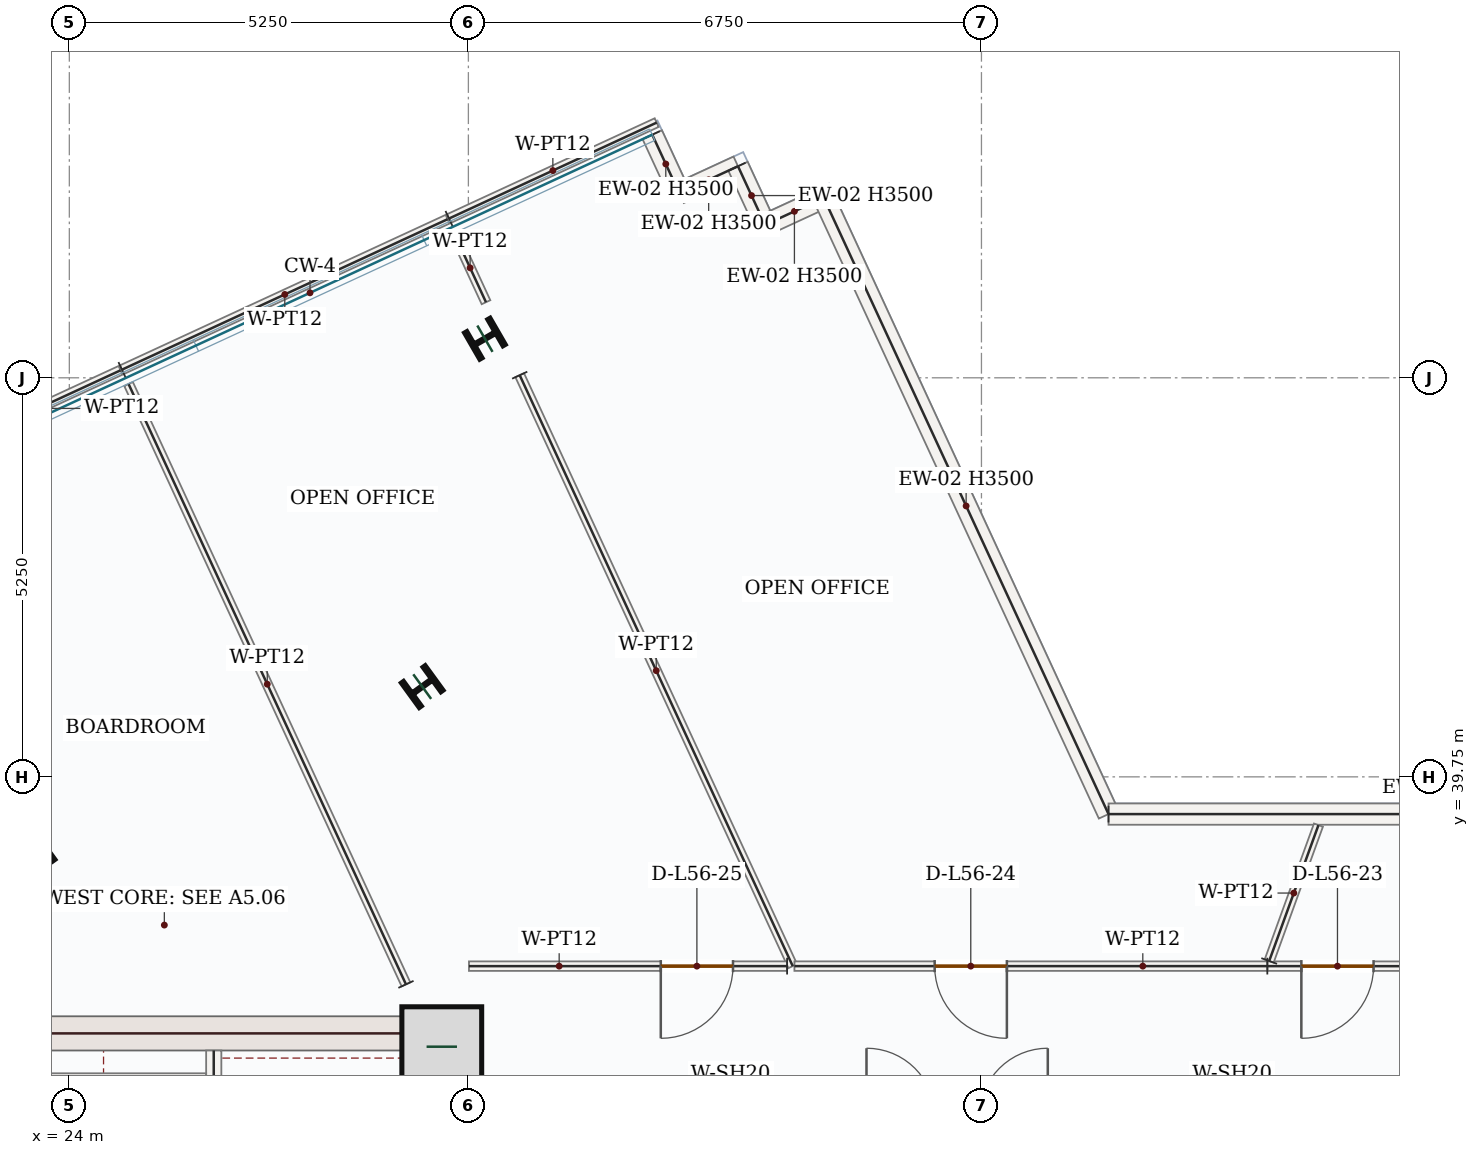
"""IFC4 building model, lengths in metres.
Left out: names, types, materials, properties, quantities, classifications, styles, units other than length and angle.
Written with IfcOpenShell. Run it as: python <this file> out.ifc"""

import sys

from ifc_helpers import new_model, si_unit, direction, frame, frame_2d, origin, origin_2d, place, context, subcontext, project, spatial, rectangle, i_section, extrude, source, transform, mapped, element, fill, save


model = new_model("IFC4")
c1 = context("Model", 3, precision=1e-05, world=origin(), true_north=direction((0.0, 1.0)))
c2 = subcontext(c1, "Body", "Model", "MODEL_VIEW")
j1 = project(units=[si_unit("LENGTHUNIT", "METRE"), si_unit("PLANEANGLEUNIT", "RADIAN")], contexts=[c1])
p1 = place(None, origin())
s1 = spatial("IfcSite", under=j1, at=p1, CompositionType="ELEMENT")
p2 = place(p1, origin())
s2 = spatial("IfcBuilding", under=s1, at=p2, CompositionType="ELEMENT")
p3 = place(p2, frame((0.0, 0.0, 239.1)))
s3 = spatial("IfcBuildingStorey", under=s2, at=p3, CompositionType="ELEMENT", Elevation=239.1)
p4 = place(p3, frame((29.025, 28.05, 0.0), z_axis=(0.0, 0.0, 1.0), x_axis=(0.0, 1.0, 0.0)))
e1 = element("IfcWall", 1, at=p4, inside=s3, PredefinedType="SHEAR", context=c2, shape_type="SweptSolid", body=[
    extrude(rectangle(XDim=8.55, YDim=0.45, at=frame_2d((4.275, 0.0))), origin(), (0.0, 0.0, 1.0), 3.5),
])
p5 = place(p4, frame((1.5, 0.0, 0.0)))
e2 = element("IfcOpeningElement", 2, at=p5, cuts=e1, PredefinedType="OPENING", context=c2, shape_type="SweptSolid", body=[
    extrude(rectangle(XDim=1.1, YDim=2.2, at=frame_2d((0.55, 1.1))), frame((0.0, 0.235, 0.0), z_axis=(0.0, -1.0, 0.0), x_axis=(1.0, 0.0, 0.0)), (0.0, 0.0, 1.0), 0.47),
])
m1 = source(origin(), c2, "Body", "SweptSolid", [
    extrude(rectangle(XDim=7.1, YDim=0.45, at=frame_2d((3.55, 0.0))), origin(), (0.0, 0.0, 1.0), 3.5),
])
p6 = place(p3, frame((21.7, 36.375, 0.0), z_axis=(0.0, 0.0, 1.0), x_axis=(1.0, 0.0, 0.0)))
e3 = element("IfcWall", 3, at=p6, inside=s3, PredefinedType="SHEAR", context=c2, shape_type="MappedRepresentation", body=[
    mapped(m1, transform((0.0, 0.0, 0.0), x_axis=(1.0, 0.0, 0.0), y_axis=(0.0, 1.0, 0.0), z_axis=(0.0, 0.0, 1.0), scale=1.0)),
])
m2 = source(origin(), c2, "Body", "SweptSolid", [
    extrude(rectangle(XDim=1.05, YDim=1.05, at=origin_2d()), origin(), (0.0, 0.0, 1.0), 3.75),
])
p7 = place(p3, frame((28.9, 36.2, 0.0), z_axis=(0.0, 0.0, 1.0), x_axis=(1.0, 0.0, 0.0)))
e4 = element("IfcColumn", 4, at=p7, inside=s3, PredefinedType="COLUMN", context=c2, shape_type="MappedRepresentation", body=[
    mapped(m2, transform((0.0, 0.0, 0.0), x_axis=(1.0, 0.0, 0.0), y_axis=(0.0, 1.0, 0.0), z_axis=(0.0, 0.0, 1.0), scale=1.0)),
])
m3 = source(origin(), c2, "Body", "SweptSolid", [
    extrude(i_section(OverallWidth=0.399, OverallDepth=0.386, WebThickness=0.021, FlangeThickness=0.033, FilletRadius=0.018, at=origin_2d()), origin(), (0.0, 0.0, 1.0), 3.75),
])
for number, where, z_axis, x_axis in (
    (5, (28.643, 40.937, 0.0), (0.0, 0.0, 1.0), (-0.588, 0.809, 0.0)),
    (6, (23.536, 38.711, 0.0), (0.0, 0.0, 1.0), (-0.588, 0.809, 0.0)),
    (7, (29.468, 45.514, 0.0), (0.0, 0.0, 1.0), (-0.5, 0.866, 0.0)),
):
    element("IfcColumn", number, at=place(p3, frame(where, z_axis=z_axis, x_axis=x_axis)), inside=s3, PredefinedType="COLUMN", context=c2, shape_type="MappedRepresentation", body=[
        mapped(m3, transform((0.0, 0.0, 0.0), x_axis=(1.0, 0.0, 0.0), y_axis=(0.0, 1.0, 0.0), z_axis=(0.0, 0.0, 1.0), scale=1.0)),
    ])
m4 = source(origin(), c2, "Body", "SweptSolid", [
    extrude(rectangle(XDim=0.85, YDim=0.28, at=frame_2d((0.425, 0.0))), origin(), (0.0, 0.0, 1.0), 3.5),
])
p8 = place(p3, frame((31.669, 48.198, 0.0), z_axis=(0.0, 0.0, 1.0), x_axis=(0.419422493365, -0.907791150023, 0.0)))
e8 = element("IfcWall", 8, at=p8, inside=s3, PredefinedType="SOLIDWALL", context=c2, shape_type="MappedRepresentation", body=[
    mapped(m4, transform((0.0, 0.0, 0.0), x_axis=(1.0, 0.0, 0.0), y_axis=(0.0, 1.0, 0.0), z_axis=(0.0, 0.0, 1.0), scale=1.0)),
])
m5 = source(origin(), c2, "Body", "SweptSolid", [
    extrude(rectangle(XDim=0.85, YDim=0.28, at=frame_2d((0.425, 0.0))), origin(), (0.0, 0.0, 1.0), 3.5),
])
p9 = place(p3, frame((32.025, 47.427, 0.0), z_axis=(0.0, 0.0, 1.0), x_axis=(0.907841666427, 0.419313139191, 0.0)))
e9 = element("IfcWall", 9, at=p9, inside=s3, PredefinedType="SOLIDWALL", context=c2, shape_type="MappedRepresentation", body=[
    mapped(m5, transform((0.0, 0.0, 0.0), x_axis=(1.0, 0.0, 0.0), y_axis=(0.0, 1.0, 0.0), z_axis=(0.0, 0.0, 1.0), scale=1.0)),
])
p10 = place(p3, frame((32.797, 47.783, 0.0), z_axis=(0.0, 0.0, 1.0), x_axis=(0.419422493365, -0.907791150023, 0.0)))
e10 = element("IfcWall", 10, at=p10, inside=s3, PredefinedType="SOLIDWALL", context=c2, shape_type="MappedRepresentation", body=[
    mapped(m4, transform((0.0, 0.0, 0.0), x_axis=(1.0, 0.0, 0.0), y_axis=(0.0, 1.0, 0.0), z_axis=(0.0, 0.0, 1.0), scale=1.0)),
])
p11 = place(p3, frame((33.154, 47.012, 0.0), z_axis=(0.0, 0.0, 1.0), x_axis=(0.907841666427, 0.419313139191, 0.0)))
e11 = element("IfcWall", 11, at=p11, inside=s3, PredefinedType="SOLIDWALL", context=c2, shape_type="MappedRepresentation", body=[
    mapped(m5, transform((0.0, 0.0, 0.0), x_axis=(1.0, 0.0, 0.0), y_axis=(0.0, 1.0, 0.0), z_axis=(0.0, 0.0, 1.0), scale=1.0)),
])
m6 = source(origin(), c2, "Body", "SweptSolid", [
    extrude(rectangle(XDim=8.932, YDim=0.28, at=frame_2d((4.466, 0.0))), origin(), (0.0, 0.0, 1.0), 3.5),
])
p12 = place(p3, frame((33.925, 47.368, 0.0), z_axis=(0.0, 0.0, 1.0), x_axis=(0.419437747849, -0.90778410191, 0.0)))
e12 = element("IfcWall", 12, at=p12, inside=s3, PredefinedType="SOLIDWALL", context=c2, shape_type="MappedRepresentation", body=[
    mapped(m6, transform((0.0, 0.0, 0.0), x_axis=(1.0, 0.0, 0.0), y_axis=(0.0, 1.0, 0.0), z_axis=(0.0, 0.0, 1.0), scale=1.0)),
])
m7 = source(origin(), c2, "Body", "SweptSolid", [
    extrude(rectangle(XDim=8.984, YDim=0.28, at=frame_2d((4.492, 0.0))), origin(), (0.0, 0.0, 1.0), 2.772),
])
p13 = place(p3, frame((37.672, 39.26, 0.0), z_axis=(0.0, 0.0, 1.0), x_axis=(1.0, 0.0, 0.0)))
e13 = element("IfcWall", 13, at=p13, inside=s3, PredefinedType="SOLIDWALL", context=c2, shape_type="MappedRepresentation", body=[
    mapped(m7, transform((0.0, 0.0, 0.0), x_axis=(1.0, 0.0, 0.0), y_axis=(0.0, 1.0, 0.0), z_axis=(0.0, 0.0, 1.0), scale=1.0)),
])
p14 = place(p3, frame((25.9, 28.15, 0.0), z_axis=(0.0, 0.0, 1.0), x_axis=(0.0, 1.0, 0.0)))
e14 = element("IfcWall", 14, at=p14, inside=s3, PredefinedType="SOLIDWALL", context=c2, shape_type="SweptSolid", body=[
    extrude(rectangle(XDim=8.0, YDim=0.2, at=frame_2d((4.0, 0.0))), origin(), (0.0, 0.0, 1.0), 3.5),
])
p15 = place(p14, frame((0.4, 0.0, 0.0)))
e15 = element("IfcOpeningElement", 15, at=p15, cuts=e14, PredefinedType="OPENING", context=c2, shape_type="SweptSolid", body=[
    extrude(rectangle(XDim=1.05, YDim=2.15, at=frame_2d((0.525, 1.075))), frame((0.0, 0.11, 0.0), z_axis=(0.0, -1.0, 0.0), x_axis=(1.0, 0.0, 0.0)), (0.0, 0.0, 1.0), 0.22),
])
m8 = source(origin(), c2, "Body", "SweptSolid", [
    extrude(rectangle(XDim=3.25, YDim=0.2, at=frame_2d((1.625, 0.0))), origin(), (0.0, 0.0, 1.0), 3.5),
])
p16 = place(p3, frame((22.55, 35.75, 0.0), z_axis=(0.0, 0.0, 1.0), x_axis=(1.0, 0.0, 0.0)))
e16 = element("IfcWall", 16, at=p16, inside=s3, PredefinedType="SOLIDWALL", context=c2, shape_type="MappedRepresentation", body=[
    mapped(m8, transform((0.0, 0.0, 0.0), x_axis=(1.0, 0.0, 0.0), y_axis=(0.0, 1.0, 0.0), z_axis=(0.0, 0.0, 1.0), scale=1.0)),
])
p17 = place(p3, frame((42.747, 37.259, 0.0), z_axis=(0.0, 0.0, 1.0), x_axis=(-0.999999916415, 0.000408864141, 0.0)))
e17 = element("IfcWall", 17, at=p17, inside=s3, PredefinedType="PARTITIONING", context=c2, shape_type="SweptSolid", body=[
    extrude(rectangle(XDim=2.986, YDim=0.125, at=frame_2d((1.493, 0.0))), origin(), (0.0, 0.0, 1.0), 3.5),
])
p18 = place(p17, frame((1.588, 0.0, 0.0)))
e18 = element("IfcOpeningElement", 18, at=p18, cuts=e17, PredefinedType="OPENING", context=c2, shape_type="SweptSolid", body=[
    extrude(rectangle(XDim=0.95, YDim=2.15, at=frame_2d((0.475, 1.075))), frame((0.0, 0.073, 0.0), z_axis=(0.0, -1.0, 0.0), x_axis=(1.0, 0.0, 0.0)), (0.0, 0.0, 1.0), 0.145),
])
m9 = source(origin(), c2, "Body", "SweptSolid", [
    extrude(rectangle(XDim=1.901, YDim=0.125, at=frame_2d((0.951, 0.0))), origin(), (0.0, 0.0, 1.0), 3.5),
])
p19 = place(p3, frame((39.785, 37.327, 0.0), z_axis=(0.0, 0.0, 1.0), x_axis=(0.340887270823, 0.940104179648, 0.0)))
e19 = element("IfcWall", 19, at=p19, inside=s3, PredefinedType="PARTITIONING", context=c2, shape_type="MappedRepresentation", body=[
    mapped(m9, transform((0.0, 0.0, 0.0), x_axis=(1.0, 0.0, 0.0), y_axis=(0.0, 1.0, 0.0), z_axis=(0.0, 0.0, 1.0), scale=1.0)),
])
m10 = source(origin(), c2, "Body", "SweptSolid", [
    extrude(rectangle(XDim=8.564, YDim=0.125, at=frame_2d((4.282, 0.0))), origin(), (0.0, 0.0, 1.0), 3.5),
])
p20 = place(p3, frame((29.925, 45.034, 0.0), z_axis=(0.0, 0.0, 1.0), x_axis=(0.419463084945, -0.907772394584, 0.0)))
e20 = element("IfcWall", 20, at=p20, inside=s3, PredefinedType="PARTITIONING", context=c2, shape_type="MappedRepresentation", body=[
    mapped(m10, transform((0.0, 0.0, 0.0), x_axis=(1.0, 0.0, 0.0), y_axis=(0.0, 1.0, 0.0), z_axis=(0.0, 0.0, 1.0), scale=1.0)),
])
p21 = place(p3, frame((33.443, 37.26, 0.0), z_axis=(0.0, 0.0, 1.0), x_axis=(-0.999999998299, -5.8329445e-05, 0.0)))
e21 = element("IfcWall", 21, at=p21, inside=s3, PredefinedType="PARTITIONING", context=c2, shape_type="SweptSolid", body=[
    extrude(rectangle(XDim=4.186, YDim=0.125, at=frame_2d((2.093, 0.0))), origin(), (0.0, 0.0, 1.0), 3.5),
])
p22 = place(p21, frame((0.712, 0.0, 0.0)))
e22 = element("IfcOpeningElement", 22, at=p22, cuts=e21, PredefinedType="OPENING", context=c2, shape_type="SweptSolid", body=[
    extrude(rectangle(XDim=0.95, YDim=2.15, at=frame_2d((0.475, 1.075))), frame((0.0, 0.073, 0.0), z_axis=(0.0, -1.0, 0.0), x_axis=(1.0, 0.0, 0.0)), (0.0, 0.0, 1.0), 0.145),
])
m11 = source(origin(), c2, "Body", "SweptSolid", [
    extrude(rectangle(XDim=8.701, YDim=0.125, at=frame_2d((4.351, 0.0))), origin(), (0.0, 0.0, 1.0), 3.5),
])
p23 = place(p3, frame((28.429, 37.02, 0.0), z_axis=(0.0, 0.0, 1.0), x_axis=(-0.419458495046, 0.907774515468, 0.0)))
e23 = element("IfcWall", 23, at=p23, inside=s3, PredefinedType="PARTITIONING", context=c2, shape_type="MappedRepresentation", body=[
    mapped(m11, transform((0.0, 0.0, 0.0), x_axis=(1.0, 0.0, 0.0), y_axis=(0.0, 1.0, 0.0), z_axis=(0.0, 0.0, 1.0), scale=1.0)),
])
m12 = source(origin(), c2, "Body", "SweptSolid", [
    extrude(rectangle(XDim=4.72, YDim=0.125, at=frame_2d((2.36, 0.0))), origin(), (0.0, 0.0, 1.0), 3.5),
])
p24 = place(p3, frame((24.692, 45.107, 0.0), z_axis=(0.0, 0.0, 1.0), x_axis=(0.907753377062, 0.419504238873, 0.0)))
e24 = element("IfcWall", 24, at=p24, inside=s3, PredefinedType="PARTITIONING", context=c2, shape_type="MappedRepresentation", body=[
    mapped(m12, transform((0.0, 0.0, 0.0), x_axis=(1.0, 0.0, 0.0), y_axis=(0.0, 1.0, 0.0), z_axis=(0.0, 0.0, 1.0), scale=1.0)),
])
m13 = source(origin(), c2, "Body", "SweptSolid", [
    extrude(rectangle(XDim=0.996, YDim=0.125, at=frame_2d((0.498, 0.0))), origin(), (0.0, 0.0, 1.0), 3.5),
])
p25 = place(p3, frame((29.064, 46.898, 0.0), z_axis=(0.0, 0.0, 1.0), x_axis=(0.419540149112, -0.907736780836, 0.0)))
e25 = element("IfcWall", 25, at=p25, inside=s3, PredefinedType="PARTITIONING", context=c2, shape_type="MappedRepresentation", body=[
    mapped(m13, transform((0.0, 0.0, 0.0), x_axis=(1.0, 0.0, 0.0), y_axis=(0.0, 1.0, 0.0), z_axis=(0.0, 0.0, 1.0), scale=1.0)),
])
m14 = source(origin(), c2, "Body", "SweptSolid", [
    extrude(rectangle(XDim=2.39, YDim=0.125, at=frame_2d((1.195, 0.0))), origin(), (0.0, 0.0, 1.0), 3.5),
])
p26 = place(p3, frame((22.505, 44.096, 0.0), z_axis=(0.0, 0.0, 1.0), x_axis=(0.907773916688, 0.419459790898, 0.0)))
e26 = element("IfcWall", 26, at=p26, inside=s3, PredefinedType="PARTITIONING", context=c2, shape_type="MappedRepresentation", body=[
    mapped(m14, transform((0.0, 0.0, 0.0), x_axis=(1.0, 0.0, 0.0), y_axis=(0.0, 1.0, 0.0), z_axis=(0.0, 0.0, 1.0), scale=1.0)),
])
m15 = source(origin(), c2, "Body", "SweptSolid", [
    extrude(rectangle(XDim=3.01, YDim=0.125, at=frame_2d((1.505, 0.0))), origin(), (0.0, 0.0, 1.0), 3.5),
])
p27 = place(p3, frame((28.995, 47.095, 0.0), z_axis=(0.0, 0.0, 1.0), x_axis=(0.907790759102, 0.419423339467, 0.0)))
e27 = element("IfcWall", 27, at=p27, inside=s3, PredefinedType="PARTITIONING", context=c2, shape_type="MappedRepresentation", body=[
    mapped(m15, transform((0.0, 0.0, 0.0), x_axis=(1.0, 0.0, 0.0), y_axis=(0.0, 1.0, 0.0), z_axis=(0.0, 0.0, 1.0), scale=1.0)),
])
p28 = place(p3, frame((39.761, 37.26, 0.0), z_axis=(0.0, 0.0, 1.0), x_axis=(-1.0, 0.0, 0.0)))
e28 = element("IfcWall", 28, at=p28, inside=s3, PredefinedType="PARTITIONING", context=c2, shape_type="SweptSolid", body=[
    extrude(rectangle(XDim=6.221, YDim=0.125, at=frame_2d((3.111, 0.0))), origin(), (0.0, 0.0, 1.0), 3.5),
])
p29 = place(p28, frame((3.427, 0.0, 0.0)))
e29 = element("IfcOpeningElement", 29, at=p29, cuts=e28, PredefinedType="OPENING", context=c2, shape_type="SweptSolid", body=[
    extrude(rectangle(XDim=0.95, YDim=2.15, at=frame_2d((0.475, 1.075))), frame((0.0, 0.073, 0.0), z_axis=(0.0, -1.0, 0.0), x_axis=(1.0, 0.0, 0.0)), (0.0, 0.0, 1.0), 0.145),
])
m16 = source(origin(), c2, "Body", "SweptSolid", [
    extrude(rectangle(XDim=0.95, YDim=2.15, at=frame_2d((0.475, 1.075))), frame((0.0, 0.025, 0.0), z_axis=(0.0, -1.0, 0.0), x_axis=(1.0, 0.0, 0.0)), (0.0, 0.0, 1.0), 0.05),
])
p30 = place(p18, origin())
e30 = element("IfcDoor", 30, at=p30, inside=s3, OperationType="SINGLE_SWING_RIGHT", PredefinedType="DOOR", context=c2, shape_type="MappedRepresentation", body=[
    mapped(m16, transform((0.0, 0.0, 0.0), x_axis=(1.0, 0.0, 0.0), y_axis=(0.0, 1.0, 0.0), z_axis=(0.0, 0.0, 1.0), scale=1.0)),
])
fill(e18, e30)
p31 = place(p29, origin())
e31 = element("IfcDoor", 31, at=p31, inside=s3, OperationType="SINGLE_SWING_LEFT", PredefinedType="DOOR", context=c2, shape_type="MappedRepresentation", body=[
    mapped(m16, transform((0.0, 0.0, 0.0), x_axis=(1.0, 0.0, 0.0), y_axis=(0.0, 1.0, 0.0), z_axis=(0.0, 0.0, 1.0), scale=1.0)),
])
fill(e29, e31)
p32 = place(p22, origin())
e32 = element("IfcDoor", 32, at=p32, inside=s3, OperationType="SINGLE_SWING_RIGHT", PredefinedType="DOOR", context=c2, shape_type="MappedRepresentation", body=[
    mapped(m16, transform((0.0, 0.0, 0.0), x_axis=(1.0, 0.0, 0.0), y_axis=(0.0, 1.0, 0.0), z_axis=(0.0, 0.0, 1.0), scale=1.0)),
])
fill(e22, e32)
save(model, sys.argv[1])
